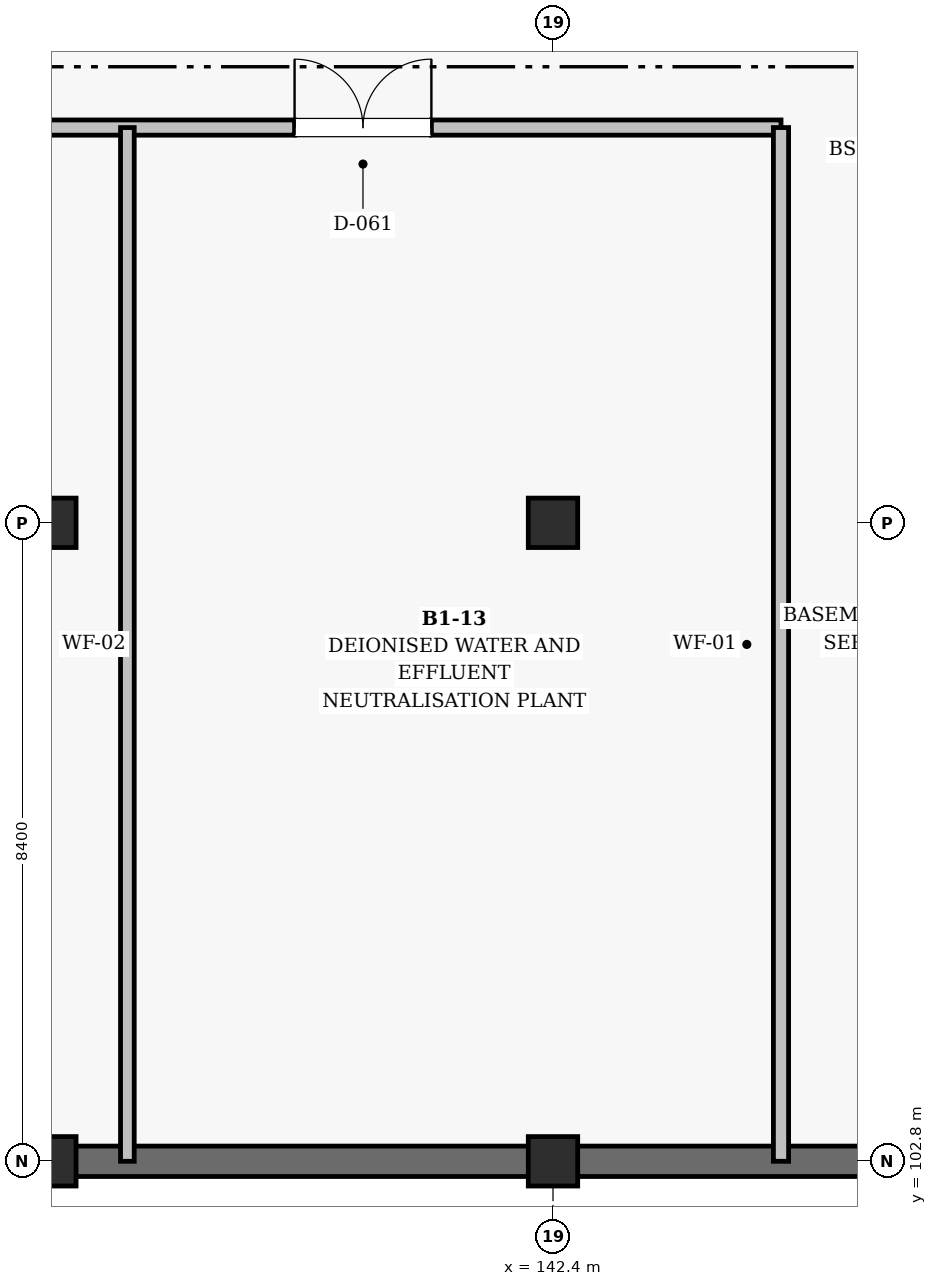
"""IFC4 building model, lengths in metres.
Left out: names, types, materials, properties, quantities, classifications, styles, units other than length and angle.
Written with IfcOpenShell. Run it as: python <this file> out.ifc"""

import sys

from ifc_helpers import new_model, si_unit, direction, frame, frame_2d, origin, origin_2d, place, context, subcontext, project, spatial, rectangle, extrude, element, fill, save


model = new_model("IFC4")
c1 = context("Model", 3, precision=1e-05, world=origin(), true_north=direction((0.0, 1.0)))
c2 = subcontext(c1, "Body", "Model", "MODEL_VIEW")
j1 = project(units=[si_unit("LENGTHUNIT", "METRE"), si_unit("PLANEANGLEUNIT", "RADIAN")], contexts=[c1])
p1 = place(None, origin())
s1 = spatial("IfcSite", under=j1, at=p1, CompositionType="ELEMENT")
p2 = place(p1, origin())
s2 = spatial("IfcBuilding", under=s1, at=p2, CompositionType="ELEMENT")
p3 = place(p2, frame((0.0, 0.0, -4.5)))
s3 = spatial("IfcBuildingStorey", under=s2, at=p3, CompositionType="ELEMENT", Elevation=-4.5)
for number, where, z_axis, x_axis in (
    (1, (135.8, 102.8, 0.0), (0.0, 0.0, 1.0), (1.0, 0.0, 0.0)),
    (2, (135.8, 111.2, 0.0), (0.0, 0.0, 1.0), (1.0, 0.0, 0.0)),
    (3, (142.4, 102.8, 0.0), (0.0, 0.0, 1.0), (1.0, 0.0, 0.0)),
    (4, (142.4, 111.2, 0.0), (0.0, 0.0, 1.0), (1.0, 0.0, 0.0)),
):
    element("IfcColumn", number, at=place(p3, frame(where, z_axis=z_axis, x_axis=x_axis)), inside=s3, PredefinedType="COLUMN", context=c2, shape_type="SweptSolid", body=[
        extrude(rectangle(XDim=0.65, YDim=0.65, at=origin_2d()), origin(), (0.0, 0.0, 1.0), 4.5),
    ])
p4 = place(p3, frame((114.8, 102.8, 0.0), z_axis=(0.0, 0.0, 1.0), x_axis=(1.0, 0.0, 0.0)))
e5 = element("IfcWall", 5, at=p4, inside=s3, PredefinedType="USERDEFINED", context=c2, shape_type="SweptSolid", body=[
    extrude(rectangle(XDim=67.2, YDim=0.4, at=frame_2d((33.6, 0.0))), origin(), (0.0, 0.0, 1.0), 4.16),
])
p5 = place(p3, frame((86.8, 116.4, 0.0), z_axis=(0.0, 0.0, 1.0), x_axis=(1.0, 0.0, 0.0)))
e6 = element("IfcWall", 6, at=p5, inside=s3, PredefinedType="SOLIDWALL", context=c2, shape_type="SweptSolid", body=[
    extrude(rectangle(XDim=58.6, YDim=0.2, at=frame_2d((29.3, 0.0))), origin(), (0.0, 0.0, 1.0), 2.92),
])
p6 = place(p5, frame((3.2, 0.0, 0.0)))
e7 = element("IfcOpeningElement", 7, at=p6, cuts=e6, PredefinedType="OPENING", context=c2, shape_type="SweptSolid", body=[
    extrude(rectangle(XDim=1.8, YDim=2.25, at=frame_2d((0.9, 1.125))), frame((0.0, 0.11, 0.0), z_axis=(0.0, -1.0, 0.0), x_axis=(1.0, 0.0, 0.0)), (0.0, 0.0, 1.0), 0.22),
])
p7 = place(p5, frame((19.2, 0.0, 0.0)))
e8 = element("IfcOpeningElement", 8, at=p7, cuts=e6, PredefinedType="OPENING", context=c2, shape_type="SweptSolid", body=[
    extrude(rectangle(XDim=1.8, YDim=2.25, at=frame_2d((0.9, 1.125))), frame((0.0, 0.11, 0.0), z_axis=(0.0, -1.0, 0.0), x_axis=(1.0, 0.0, 0.0)), (0.0, 0.0, 1.0), 0.22),
])
p8 = place(p5, frame((34.8, 0.0, 0.0)))
e9 = element("IfcOpeningElement", 9, at=p8, cuts=e6, PredefinedType="OPENING", context=c2, shape_type="SweptSolid", body=[
    extrude(rectangle(XDim=1.8, YDim=2.25, at=frame_2d((0.9, 1.125))), frame((0.0, 0.11, 0.0), z_axis=(0.0, -1.0, 0.0), x_axis=(1.0, 0.0, 0.0)), (0.0, 0.0, 1.0), 0.22),
])
p9 = place(p5, frame((52.2, 0.0, 0.0)))
e10 = element("IfcOpeningElement", 10, at=p9, cuts=e6, PredefinedType="OPENING", context=c2, shape_type="SweptSolid", body=[
    extrude(rectangle(XDim=1.8, YDim=2.25, at=frame_2d((0.9, 1.125))), frame((0.0, 0.11, 0.0), z_axis=(0.0, -1.0, 0.0), x_axis=(1.0, 0.0, 0.0)), (0.0, 0.0, 1.0), 0.22),
])
p10 = place(p3, frame((145.4, 102.8, 0.0), z_axis=(0.0, 0.0, 1.0), x_axis=(0.0, 1.0, 0.0)))
e11 = element("IfcWall", 11, at=p10, inside=s3, PredefinedType="SOLIDWALL", context=c2, shape_type="SweptSolid", body=[
    extrude(rectangle(XDim=13.6, YDim=0.2, at=frame_2d((6.8, 0.0))), origin(), (0.0, 0.0, 1.0), 3.42),
])
p11 = place(p3, frame((136.8, 102.8, 0.0), z_axis=(0.0, 0.0, 1.0), x_axis=(0.0, 1.0, 0.0)))
e12 = element("IfcWall", 12, at=p11, inside=s3, PredefinedType="SOLIDWALL", context=c2, shape_type="SweptSolid", body=[
    extrude(rectangle(XDim=13.6, YDim=0.18, at=frame_2d((6.8, 0.0))), origin(), (0.0, 0.0, 1.0), 3.42),
])
p12 = place(p9, origin())
e13 = element("IfcDoor", 13, at=p12, inside=s3, OperationType="DOUBLE_DOOR_SINGLE_SWING", PredefinedType="DOOR", context=c2, shape_type="SweptSolid", body=[
    extrude(rectangle(XDim=1.8, YDim=2.25, at=frame_2d((0.9, 1.125))), frame((0.0, 0.025, 0.0), z_axis=(0.0, -1.0, 0.0), x_axis=(1.0, 0.0, 0.0)), (0.0, 0.0, 1.0), 0.05),
])
fill(e10, e13)
save(model, sys.argv[1])
